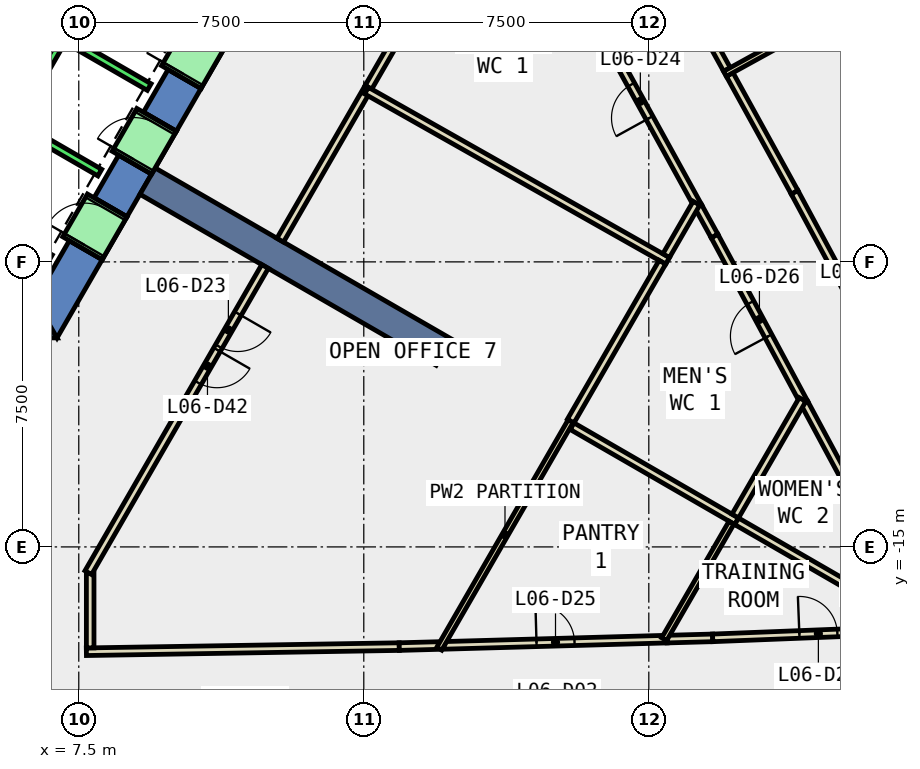
"""IFC4 building model, lengths in metres.
Left out: names, types, materials, properties, quantities, classifications, styles, units other than length and angle.
Written with IfcOpenShell. Run it as: python <this file> out.ifc"""

import sys

from ifc_helpers import new_model, si_unit, direction, frame, frame_2d, origin, place, context, subcontext, project, spatial, polyline, rectangle, outline, extrude, element, fill, save


model = new_model("IFC4")
c1 = context("Model", 3, precision=1e-05, world=origin(), true_north=direction((0.0, 1.0)))
c2 = subcontext(c1, "Body", "Model", "MODEL_VIEW")
j1 = project(units=[si_unit("LENGTHUNIT", "METRE"), si_unit("PLANEANGLEUNIT", "RADIAN")], contexts=[c1])
p1 = place(None, origin())
s1 = spatial("IfcSite", under=j1, at=p1, CompositionType="ELEMENT")
p2 = place(p1, origin())
s2 = spatial("IfcBuilding", under=s1, at=p2, CompositionType="ELEMENT")
p3 = place(p2, frame((0.0, 0.0, 35.0)))
s3 = spatial("IfcBuildingStorey", under=s2, at=p3, CompositionType="ELEMENT", Elevation=35.0)
p4 = place(p3, frame((0.0, 0.0, -0.6)))
e1 = element("IfcWall", 1, at=p4, inside=s3, PredefinedType="SHEAR", context=c2, shape_type="SweptSolid", body=[
    extrude(outline(polyline([(5.75, -8.5), (5.75, -9.5), (6.928, -9.5), (6.351, -8.5), (5.75, -8.5)])), origin(), (0.0, 0.0, 1.0), 4.4),
])
p5 = place(p3, frame((0.0, 0.0, -0.6)))
e2 = element("IfcWall", 2, at=p5, inside=s3, PredefinedType="SHEAR", context=c2, shape_type="SweptSolid", body=[
    extrude(outline(polyline([(8.117, -7.44), (7.252, -6.94), (6.351, -8.5), (6.928, -9.5), (8.117, -7.44)])), origin(), (0.0, 0.0, 1.0), 4.4),
])
p6 = place(p3, frame((0.0, 0.0, -0.6)))
e3 = element("IfcWall", 3, at=p6, inside=s3, PredefinedType="SHEAR", context=c2, shape_type="SweptSolid", body=[
    extrude(outline(polyline([(9.417, -5.189), (8.551, -4.689), (7.902, -5.814), (8.767, -6.314), (9.417, -5.189)])), origin(), (0.0, 0.0, 1.0), 4.4),
])
p7 = place(p3, frame((0.0, 0.0, -0.6)))
e4 = element("IfcWall", 4, at=p7, inside=s3, PredefinedType="SHEAR", context=c2, shape_type="SweptSolid", body=[
    extrude(outline(polyline([(10.717, -2.937), (9.851, -2.437), (9.201, -3.563), (10.067, -4.063), (10.717, -2.937)])), origin(), (0.0, 0.0, 1.0), 4.4),
])
p8 = place(p3, frame((0.0, 0.0, 3.6)))
e5 = element("IfcWall", 5, at=p8, inside=s3, PredefinedType="SHEAR", context=c2, shape_type="SweptSolid", body=[
    extrude(outline(polyline([(8.767, -6.314), (7.902, -5.814), (7.252, -6.94), (8.117, -7.44), (8.767, -6.314)])), origin(), (0.0, 0.0, 1.0), 0.2),
])
p9 = place(p3, frame((0.0, 0.0, 3.6)))
e6 = element("IfcWall", 6, at=p9, inside=s3, PredefinedType="SHEAR", context=c2, shape_type="SweptSolid", body=[
    extrude(outline(polyline([(10.067, -4.063), (9.201, -3.563), (8.551, -4.689), (9.417, -5.189), (10.067, -4.063)])), origin(), (0.0, 0.0, 1.0), 0.2),
])
p10 = place(p3, frame((0.0, 0.0, 3.6)))
e7 = element("IfcWall", 7, at=p10, inside=s3, PredefinedType="SHEAR", context=c2, shape_type="SweptSolid", body=[
    extrude(outline(polyline([(11.367, -1.811), (10.501, -1.311), (9.851, -2.437), (10.717, -2.937), (11.367, -1.811)])), origin(), (0.0, 0.0, 1.0), 0.2),
])
p11 = place(p3, frame((9.31, -5.375, -0.6), z_axis=(0.0, 0.0, 1.0), x_axis=(0.866017533419, -0.500013631625, 0.0)))
e8 = element("IfcWall", 8, at=p11, inside=s3, PredefinedType="SHEAR", context=c2, shape_type="SweptSolid", body=[
    extrude(rectangle(XDim=9.0, YDim=0.8, at=frame_2d((4.5, 0.0))), origin(), (0.0, 0.0, 1.0), 4.4),
])
p12 = place(p3, frame((7.7, -17.758, 0.0), z_axis=(0.0, 0.0, 1.0), x_axis=(0.999865574926, 0.016396099485, 0.0)))
e9 = element("IfcWall", 9, at=p12, inside=s3, PredefinedType="PARTITIONING", context=c2, shape_type="SweptSolid", body=[
    extrude(rectangle(XDim=8.234, YDim=0.2, at=frame_2d((4.117, 0.0))), origin(), (0.0, 0.0, 1.0), 3.8),
])
p13 = place(p3, frame((15.933, -17.623, 0.0), z_axis=(0.0, 0.0, 1.0), x_axis=(0.999627129061, 0.027305729179, 0.0)))
e10 = element("IfcWall", 10, at=p13, inside=s3, PredefinedType="PARTITIONING", context=c2, shape_type="SweptSolid", body=[
    extrude(rectangle(XDim=1.028, YDim=0.2, at=frame_2d((0.514, 0.0))), origin(), (0.0, 0.0, 1.0), 3.8),
])
p14 = place(p3, frame((23.803, -6.044, 0.0), z_axis=(0.0, 0.0, 1.0), x_axis=(-0.482588436287, 0.875847247619, 0.0)))
e11 = element("IfcWall", 11, at=p14, inside=s3, PredefinedType="PARTITIONING", context=c2, shape_type="SweptSolid", body=[
    extrude(rectangle(XDim=6.324, YDim=0.2, at=frame_2d((3.162, 0.0))), origin(), (0.0, 0.0, 1.0), 3.8),
])
p15 = place(p14, frame((2.662, 0.0, 0.0)))
e12 = element("IfcOpeningElement", 12, at=p15, cuts=e11, PredefinedType="OPENING", context=c2, shape_type="SweptSolid", body=[
    extrude(rectangle(XDim=1.0, YDim=2.1, at=frame_2d((0.5, 1.05))), frame((0.0, 0.11, 0.0), z_axis=(0.0, -1.0, 0.0), x_axis=(1.0, 0.0, 0.0)), (0.0, 0.0, 1.0), 0.22),
])
p16 = place(p3, frame((17.111, -17.591, 0.0), z_axis=(0.0, 0.0, 1.0), x_axis=(0.99960470841, 0.028114532261, 0.0)))
e13 = element("IfcWall", 13, at=p16, inside=s3, PredefinedType="PARTITIONING", context=c2, shape_type="SweptSolid", body=[
    extrude(rectangle(XDim=5.87, YDim=0.2, at=frame_2d((2.935, 0.0))), origin(), (0.0, 0.0, 1.0), 3.8),
])
p17 = place(p16, frame((2.435, 0.0, 0.0)))
e14 = element("IfcOpeningElement", 14, at=p17, cuts=e13, PredefinedType="OPENING", context=c2, shape_type="SweptSolid", body=[
    extrude(rectangle(XDim=1.0, YDim=2.1, at=frame_2d((0.5, 1.05))), frame((0.0, 0.11, 0.0), z_axis=(0.0, -1.0, 0.0), x_axis=(1.0, 0.0, 0.0)), (0.0, 0.0, 1.0), 0.22),
])
p18 = place(p3, frame((26.592, -11.211, 0.0), z_axis=(0.0, 0.0, 1.0), x_axis=(-0.473737860011, 0.880665907136, 0.0)))
e15 = element("IfcWall", 15, at=p18, inside=s3, PredefinedType="PARTITIONING", context=c2, shape_type="SweptSolid", body=[
    extrude(rectangle(XDim=4.988, YDim=0.2, at=frame_2d((2.494, 0.0))), origin(), (0.0, 0.0, 1.0), 3.8),
])
p19 = place(p18, frame((1.994, 0.0, 0.0)))
e16 = element("IfcOpeningElement", 16, at=p19, cuts=e15, PredefinedType="OPENING", context=c2, shape_type="SweptSolid", body=[
    extrude(rectangle(XDim=1.0, YDim=2.1, at=frame_2d((0.5, 1.05))), frame((0.0, 0.11, 0.0), z_axis=(0.0, -1.0, 0.0), x_axis=(1.0, 0.0, 0.0)), (0.0, 0.0, 1.0), 0.22),
])
p20 = place(p3, frame((24.229, -6.818, 0.0), z_axis=(0.0, 0.0, 1.0), x_axis=(-0.482120251302, 0.876105052653, 0.0)))
e17 = element("IfcWall", 17, at=p20, inside=s3, PredefinedType="PARTITIONING", context=c2, shape_type="SweptSolid", body=[
    extrude(rectangle(XDim=0.884, YDim=0.2, at=frame_2d((0.442, 0.0))), origin(), (0.0, 0.0, 1.0), 3.8),
])
p21 = place(p3, frame((22.979, -17.426, 0.0), z_axis=(0.0, 0.0, 1.0), x_axis=(0.999623609507, 0.027434272674, 0.0)))
e18 = element("IfcWall", 18, at=p21, inside=s3, PredefinedType="PARTITIONING", context=c2, shape_type="SweptSolid", body=[
    extrude(rectangle(XDim=1.201, YDim=0.2, at=frame_2d((0.601, 0.0))), origin(), (0.0, 0.0, 1.0), 3.8),
])
p22 = place(p3, frame((24.18, -17.393, 0.0), z_axis=(0.0, 0.0, 1.0), x_axis=(0.999226657848, 0.039320303228, 0.0)))
e19 = element("IfcWall", 19, at=p22, inside=s3, PredefinedType="PARTITIONING", context=c2, shape_type="SweptSolid", body=[
    extrude(rectangle(XDim=5.57, YDim=0.2, at=frame_2d((2.785, 0.0))), origin(), (0.0, 0.0, 1.0), 3.8),
])
p23 = place(p22, frame((2.284, 0.0, 0.0)))
e20 = element("IfcOpeningElement", 20, at=p23, cuts=e19, PredefinedType="OPENING", context=c2, shape_type="SweptSolid", body=[
    extrude(rectangle(XDim=1.0, YDim=2.1, at=frame_2d((0.5, 1.05))), frame((0.0, 0.11, 0.0), z_axis=(0.0, -1.0, 0.0), x_axis=(1.0, 0.0, 0.0)), (0.0, 0.0, 1.0), 0.22),
])
p24 = place(p3, frame((27.644, -13.167, 0.0), z_axis=(0.0, 0.0, 1.0), x_axis=(-0.473660574093, 0.880707477287, 0.0)))
e21 = element("IfcWall", 21, at=p24, inside=s3, PredefinedType="PARTITIONING", context=c2, shape_type="SweptSolid", body=[
    extrude(rectangle(XDim=2.221, YDim=0.2, at=frame_2d((1.11, 0.0))), origin(), (0.0, 0.0, 1.0), 3.8),
])
p25 = place(p3, frame((24.628, -2.569, 0.0), z_axis=(0.0, 0.0, 1.0), x_axis=(0.482566980384, -0.875859069396, 0.0)))
e22 = element("IfcWall", 22, at=p25, inside=s3, PredefinedType="PARTITIONING", context=c2, shape_type="SweptSolid", body=[
    extrude(rectangle(XDim=3.542, YDim=0.2, at=frame_2d((1.771, 0.0))), origin(), (0.0, 0.0, 1.0), 3.8),
])
p26 = place(p3, frame((26.337, -5.671, 0.0), z_axis=(0.0, 0.0, 1.0), x_axis=(0.473794961698, -0.880635187958, 0.0)))
e23 = element("IfcWall", 23, at=p26, inside=s3, PredefinedType="PARTITIONING", context=c2, shape_type="SweptSolid", body=[
    extrude(rectangle(XDim=7.307, YDim=0.2, at=frame_2d((3.654, 0.0))), origin(), (0.0, 0.0, 1.0), 3.8),
])
p27 = place(p26, frame((3.154, 0.0, 0.0)))
e24 = element("IfcOpeningElement", 24, at=p27, cuts=e23, PredefinedType="OPENING", context=c2, shape_type="SweptSolid", body=[
    extrude(rectangle(XDim=1.0, YDim=2.1, at=frame_2d((0.5, 1.05))), frame((0.0, 0.11, 0.0), z_axis=(0.0, -1.0, 0.0), x_axis=(1.0, 0.0, 0.0)), (0.0, 0.0, 1.0), 0.22),
])
p28 = place(p3, frame((22.847, 0.664, 0.0), z_axis=(0.0, 0.0, 1.0), x_axis=(0.482537844436, -0.875875121628, 0.0)))
e25 = element("IfcWall", 25, at=p28, inside=s3, PredefinedType="PARTITIONING", context=c2, shape_type="SweptSolid", body=[
    extrude(rectangle(XDim=3.542, YDim=0.2, at=frame_2d((1.771, 0.0))), origin(), (0.0, 0.0, 1.0), 3.8),
])
p29 = place(p3, frame((7.8, -15.69, 0.0), z_axis=(0.0, 0.0, 1.0), x_axis=(0.0, -1.0, 0.0)))
e26 = element("IfcWall", 26, at=p29, inside=s3, PredefinedType="PARTITIONING", context=c2, shape_type="SweptSolid", body=[
    extrude(rectangle(XDim=1.967, YDim=0.2, at=frame_2d((0.983, 0.0))), origin(), (0.0, 0.0, 1.0), 3.8),
])
p30 = place(p3, frame((15.122, -2.908, 0.0), z_axis=(0.0, 0.0, 1.0), x_axis=(-0.499922740561, -0.866070004948, 0.0)))
e27 = element("IfcWall", 27, at=p30, inside=s3, PredefinedType="PARTITIONING", context=c2, shape_type="SweptSolid", body=[
    extrude(rectangle(XDim=4.643, YDim=0.2, at=frame_2d((2.321, 0.0))), origin(), (0.0, 0.0, 1.0), 3.8),
])
p31 = place(p3, frame((18.705, 3.298, 0.0), z_axis=(0.0, 0.0, 1.0), x_axis=(-0.499993769413, -0.866029000986, 0.0)))
e28 = element("IfcWall", 28, at=p31, inside=s3, PredefinedType="PARTITIONING", context=c2, shape_type="SweptSolid", body=[
    extrude(rectangle(XDim=7.166, YDim=0.2, at=frame_2d((3.583, 0.0))), origin(), (0.0, 0.0, 1.0), 3.8),
])
p32 = place(p3, frame((15.072, -2.994, 0.0), z_axis=(0.0, 0.0, 1.0), x_axis=(0.87054185148, -0.49209438609, 0.0)))
e29 = element("IfcWall", 29, at=p32, inside=s3, PredefinedType="PARTITIONING", context=c2, shape_type="SweptSolid", body=[
    extrude(rectangle(XDim=9.1, YDim=0.2, at=frame_2d((4.55, 0.0))), origin(), (0.0, 0.0, 1.0), 3.8),
])
p33 = place(p3, frame((20.445, -11.688, 0.0), z_axis=(0.0, 0.0, 1.0), x_axis=(-0.500010633597, -0.866019264387, 0.0)))
e30 = element("IfcWall", 30, at=p33, inside=s3, PredefinedType="PARTITIONING", context=c2, shape_type="SweptSolid", body=[
    extrude(rectangle(XDim=6.918, YDim=0.15, at=frame_2d((3.459, 0.0))), origin(), (0.0, 0.0, 1.0), 3.8),
])
p34 = place(p3, frame((22.857, -7.51, 0.0), z_axis=(0.0, 0.0, 1.0), x_axis=(-0.499954636112, -0.866051593054, 0.0)))
e31 = element("IfcWall", 31, at=p34, inside=s3, PredefinedType="PARTITIONING", context=c2, shape_type="SweptSolid", body=[
    extrude(rectangle(XDim=4.824, YDim=0.2, at=frame_2d((2.412, 0.0))), origin(), (0.0, 0.0, 1.0), 3.8),
])
p35 = place(p3, frame((23.754, -5.956, 0.0), z_axis=(0.0, 0.0, 1.0), x_axis=(-0.500093796661, -0.865971243484, 0.0)))
e32 = element("IfcWall", 32, at=p35, inside=s3, PredefinedType="PARTITIONING", context=c2, shape_type="SweptSolid", body=[
    extrude(rectangle(XDim=1.594, YDim=0.2, at=frame_2d((0.797, 0.0))), origin(), (0.0, 0.0, 1.0), 3.8),
])
p36 = place(p3, frame((20.482, -11.824, 0.0), z_axis=(0.0, 0.0, 1.0), x_axis=(0.866022959057, -0.500004234368, 0.0)))
e33 = element("IfcWall", 33, at=p36, inside=s3, PredefinedType="PARTITIONING", context=c2, shape_type="SweptSolid", body=[
    extrude(rectangle(XDim=5.0, YDim=0.2, at=frame_2d((2.5, 0.0))), origin(), (0.0, 0.0, 1.0), 3.8),
])
p37 = place(p3, frame((24.675, -14.362, 0.0), z_axis=(0.0, 0.0, 1.0), x_axis=(-0.500187988959, -0.865916841101, 0.0)))
e34 = element("IfcWall", 34, at=p37, inside=s3, PredefinedType="PARTITIONING", context=c2, shape_type="SweptSolid", body=[
    extrude(rectangle(XDim=3.541, YDim=0.15, at=frame_2d((1.771, 0.0))), origin(), (0.0, 0.0, 1.0), 3.8),
])
p38 = place(p3, frame((26.545, -11.123, 0.0), z_axis=(0.0, 0.0, 1.0), x_axis=(-0.500100605862, -0.865967311171, 0.0)))
e35 = element("IfcWall", 35, at=p38, inside=s3, PredefinedType="PARTITIONING", context=c2, shape_type="SweptSolid", body=[
    extrude(rectangle(XDim=3.539, YDim=0.2, at=frame_2d((1.77, 0.0))), origin(), (0.0, 0.0, 1.0), 3.8),
])
p39 = place(p3, frame((24.811, -14.326, 0.0), z_axis=(0.0, 0.0, 1.0), x_axis=(0.866076195524, -0.499912015806, 0.0)))
e36 = element("IfcWall", 36, at=p39, inside=s3, PredefinedType="PARTITIONING", context=c2, shape_type="SweptSolid", body=[
    extrude(rectangle(XDim=5.797, YDim=0.2, at=frame_2d((2.899, 0.0))), origin(), (0.0, 0.0, 1.0), 3.8),
])
p40 = place(p3, frame((24.505, -2.552, 0.0), z_axis=(0.0, 0.0, 1.0), x_axis=(0.875845276652, 0.482592013369, 0.0)))
e37 = element("IfcWall", 37, at=p40, inside=s3, PredefinedType="PARTITIONING", context=c2, shape_type="SweptSolid", body=[
    extrude(rectangle(XDim=8.1, YDim=0.15, at=frame_2d((4.05, 0.0))), origin(), (0.0, 0.0, 1.0), 3.8),
])
p41 = place(p3, frame((12.401, -7.621, 0.0), z_axis=(0.0, 0.0, 1.0), x_axis=(-0.499983724212, -0.866034800411, 0.0)))
e38 = element("IfcWall", 38, at=p41, inside=s3, PredefinedType="PARTITIONING", context=c2, shape_type="SweptSolid", body=[
    extrude(rectangle(XDim=9.302, YDim=0.2, at=frame_2d((4.651, 0.0))), origin(), (0.0, 0.0, 1.0), 3.8),
])
p42 = place(p41, frame((1.429, 0.0, 0.0)))
e39 = element("IfcOpeningElement", 39, at=p42, cuts=e38, PredefinedType="OPENING", context=c2, shape_type="SweptSolid", body=[
    extrude(rectangle(XDim=1.0, YDim=2.1, at=frame_2d((0.5, 1.05))), frame((0.0, 0.11, 0.0), z_axis=(0.0, -1.0, 0.0), x_axis=(1.0, 0.0, 0.0)), (0.0, 0.0, 1.0), 0.22),
])
p43 = place(p41, frame((2.529, 0.0, 0.0)))
e40 = element("IfcOpeningElement", 40, at=p43, cuts=e38, PredefinedType="OPENING", context=c2, shape_type="SweptSolid", body=[
    extrude(rectangle(XDim=1.0, YDim=2.1, at=frame_2d((0.5, 1.05))), frame((0.0, 0.11, 0.0), z_axis=(0.0, -1.0, 0.0), x_axis=(1.0, 0.0, 0.0)), (0.0, 0.0, 1.0), 0.22),
])
p44 = place(p3, frame((5.492, -3.788, 0.0), z_axis=(0.0, 0.0, 1.0), x_axis=(0.500011755427, 0.866018616679, 0.0)))
e41 = element("IfcWall", 41, at=p44, inside=s3, PredefinedType="STANDARD", context=c2, shape_type="SweptSolid", body=[
    extrude(rectangle(XDim=2.8, YDim=0.2, at=frame_2d((1.4, 0.0))), origin(), (0.0, 0.0, 1.0), 3.8),
])
p45 = place(p3, frame((4.451, -6.19, 0.0), z_axis=(0.0, 0.0, 1.0), x_axis=(0.50000090737, 0.866024879913, 0.0)))
e42 = element("IfcWall", 42, at=p45, inside=s3, PredefinedType="STANDARD", context=c2, shape_type="SweptSolid", body=[
    extrude(rectangle(XDim=10.6, YDim=0.2, at=frame_2d((5.3, 0.0))), origin(), (0.0, 0.0, 1.0), 3.8),
])
for number, where, z_axis, x_axis in (
    (43, (4.588, -6.153, 0.0), (0.0, 0.0, 1.0), (0.866, -0.5, 0.0)),
    (44, (5.888, -3.902, 0.0), (0.0, 0.0, 1.0), (0.866, -0.5, 0.0)),
    (45, (7.188, -1.65, 0.0), (0.0, 0.0, 1.0), (0.866, -0.5, 0.0)),
):
    element("IfcWall", number, at=place(p3, frame(where, z_axis=z_axis, x_axis=x_axis)), inside=s3, PredefinedType="STANDARD", context=c2, shape_type="SweptSolid", body=[
        extrude(rectangle(XDim=2.5, YDim=0.2, at=frame_2d((1.25, 0.0))), origin(), (0.0, 0.0, 1.0), 3.8),
    ])
p46 = place(p3, frame((7.598, -7.14, 0.0), z_axis=(0.0, 0.0, 1.0), x_axis=(0.500362116554, 0.865816234728, 0.0)))
e46 = element("IfcWall", 46, at=p46, inside=s3, PredefinedType="STANDARD", context=c2, shape_type="SweptSolid", body=[
    extrude(rectangle(XDim=1.299, YDim=1.2, at=frame_2d((0.65, 0.0))), origin(), (0.0, 0.0, 1.0), 2.4),
])
p47 = place(p46, frame((0.1, 0.0, 0.0)))
e47 = element("IfcOpeningElement", 47, at=p47, cuts=e46, PredefinedType="OPENING", context=c2, shape_type="SweptSolid", body=[
    extrude(rectangle(XDim=1.1, YDim=2.3, at=frame_2d((0.55, 1.15))), frame((0.0, 0.61, 0.0), z_axis=(0.0, -1.0, 0.0), x_axis=(1.0, 0.0, 0.0)), (0.0, 0.0, 1.0), 1.22),
])
p48 = place(p3, frame((8.898, -4.889, 0.0), z_axis=(0.0, 0.0, 1.0), x_axis=(0.500036693733, 0.866004217611, 0.0)))
e48 = element("IfcWall", 48, at=p48, inside=s3, PredefinedType="STANDARD", context=c2, shape_type="SweptSolid", body=[
    extrude(rectangle(XDim=1.3, YDim=1.2, at=frame_2d((0.65, 0.0))), origin(), (0.0, 0.0, 1.0), 2.4),
])
p49 = place(p48, frame((0.1, 0.0, 0.0)))
e49 = element("IfcOpeningElement", 49, at=p49, cuts=e48, PredefinedType="OPENING", context=c2, shape_type="SweptSolid", body=[
    extrude(rectangle(XDim=1.1, YDim=2.3, at=frame_2d((0.55, 1.15))), frame((0.0, 0.61, 0.0), z_axis=(0.0, -1.0, 0.0), x_axis=(1.0, 0.0, 0.0)), (0.0, 0.0, 1.0), 1.22),
])
p50 = place(p3, frame((10.198, -2.637, 0.0), z_axis=(0.0, 0.0, 1.0), x_axis=(0.49989585183, 0.866085525409, 0.0)))
e50 = element("IfcWall", 50, at=p50, inside=s3, PredefinedType="STANDARD", context=c2, shape_type="SweptSolid", body=[
    extrude(rectangle(XDim=1.3, YDim=1.2, at=frame_2d((0.65, 0.0))), origin(), (0.0, 0.0, 1.0), 2.4),
])
p51 = place(p50, frame((0.1, 0.0, 0.0)))
e51 = element("IfcOpeningElement", 51, at=p51, cuts=e50, PredefinedType="OPENING", context=c2, shape_type="SweptSolid", body=[
    extrude(rectangle(XDim=1.1, YDim=2.3, at=frame_2d((0.55, 1.15))), frame((0.0, 0.61, 0.0), z_axis=(0.0, -1.0, 0.0), x_axis=(1.0, 0.0, 0.0)), (0.0, 0.0, 1.0), 1.22),
])
p52 = place(p42, origin())
e52 = element("IfcDoor", 52, at=p52, inside=s3, OperationType="SINGLE_SWING_LEFT", PredefinedType="DOOR", context=c2, shape_type="SweptSolid", body=[
    extrude(rectangle(XDim=1.0, YDim=2.1, at=frame_2d((0.5, 1.05))), frame((0.0, 0.025, 0.0), z_axis=(0.0, -1.0, 0.0), x_axis=(1.0, 0.0, 0.0)), (0.0, 0.0, 1.0), 0.05),
])
fill(e39, e52)
p53 = place(p15, origin())
e53 = element("IfcDoor", 53, at=p53, inside=s3, OperationType="SINGLE_SWING_LEFT", PredefinedType="DOOR", context=c2, shape_type="SweptSolid", body=[
    extrude(rectangle(XDim=1.0, YDim=2.1, at=frame_2d((0.5, 1.05))), frame((0.0, 0.025, 0.0), z_axis=(0.0, -1.0, 0.0), x_axis=(1.0, 0.0, 0.0)), (0.0, 0.0, 1.0), 0.05),
])
fill(e12, e53)
p54 = place(p17, origin())
e54 = element("IfcDoor", 54, at=p54, inside=s3, OperationType="SINGLE_SWING_LEFT", PredefinedType="DOOR", context=c2, shape_type="SweptSolid", body=[
    extrude(rectangle(XDim=1.0, YDim=2.1, at=frame_2d((0.5, 1.05))), frame((0.0, 0.025, 0.0), z_axis=(0.0, -1.0, 0.0), x_axis=(1.0, 0.0, 0.0)), (0.0, 0.0, 1.0), 0.05),
])
fill(e14, e54)
p55 = place(p19, origin())
e55 = element("IfcDoor", 55, at=p55, inside=s3, OperationType="SINGLE_SWING_LEFT", PredefinedType="DOOR", context=c2, shape_type="SweptSolid", body=[
    extrude(rectangle(XDim=1.0, YDim=2.1, at=frame_2d((0.5, 1.05))), frame((0.0, 0.025, 0.0), z_axis=(0.0, -1.0, 0.0), x_axis=(1.0, 0.0, 0.0)), (0.0, 0.0, 1.0), 0.05),
])
fill(e16, e55)
p56 = place(p23, origin())
e56 = element("IfcDoor", 56, at=p56, inside=s3, OperationType="SINGLE_SWING_LEFT", PredefinedType="DOOR", context=c2, shape_type="SweptSolid", body=[
    extrude(rectangle(XDim=1.0, YDim=2.1, at=frame_2d((0.5, 1.05))), frame((0.0, 0.025, 0.0), z_axis=(0.0, -1.0, 0.0), x_axis=(1.0, 0.0, 0.0)), (0.0, 0.0, 1.0), 0.05),
])
fill(e20, e56)
p57 = place(p43, origin())
e57 = element("IfcDoor", 57, at=p57, inside=s3, OperationType="SINGLE_SWING_RIGHT", PredefinedType="DOOR", context=c2, shape_type="SweptSolid", body=[
    extrude(rectangle(XDim=1.0, YDim=2.1, at=frame_2d((0.5, 1.05))), frame((0.0, 0.025, 0.0), z_axis=(0.0, -1.0, 0.0), x_axis=(1.0, 0.0, 0.0)), (0.0, 0.0, 1.0), 0.05),
])
fill(e40, e57)
p58 = place(p47, origin())
e58 = element("IfcDoor", 58, at=p58, inside=s3, OperationType="SLIDING_TO_LEFT", PredefinedType="DOOR", context=c2, shape_type="SweptSolid", body=[
    extrude(rectangle(XDim=1.1, YDim=2.3, at=frame_2d((0.55, 1.15))), frame((0.0, 0.025, 0.0), z_axis=(0.0, -1.0, 0.0), x_axis=(1.0, 0.0, 0.0)), (0.0, 0.0, 1.0), 0.05),
])
fill(e47, e58)
p59 = place(p49, origin())
e59 = element("IfcDoor", 59, at=p59, inside=s3, OperationType="SLIDING_TO_LEFT", PredefinedType="DOOR", context=c2, shape_type="SweptSolid", body=[
    extrude(rectangle(XDim=1.1, YDim=2.3, at=frame_2d((0.55, 1.15))), frame((0.0, 0.025, 0.0), z_axis=(0.0, -1.0, 0.0), x_axis=(1.0, 0.0, 0.0)), (0.0, 0.0, 1.0), 0.05),
])
fill(e49, e59)
p60 = place(p51, origin())
e60 = element("IfcDoor", 60, at=p60, inside=s3, OperationType="SLIDING_TO_LEFT", PredefinedType="DOOR", context=c2, shape_type="SweptSolid", body=[
    extrude(rectangle(XDim=1.1, YDim=2.3, at=frame_2d((0.55, 1.15))), frame((0.0, 0.025, 0.0), z_axis=(0.0, -1.0, 0.0), x_axis=(1.0, 0.0, 0.0)), (0.0, 0.0, 1.0), 0.05),
])
fill(e51, e60)
save(model, sys.argv[1])
